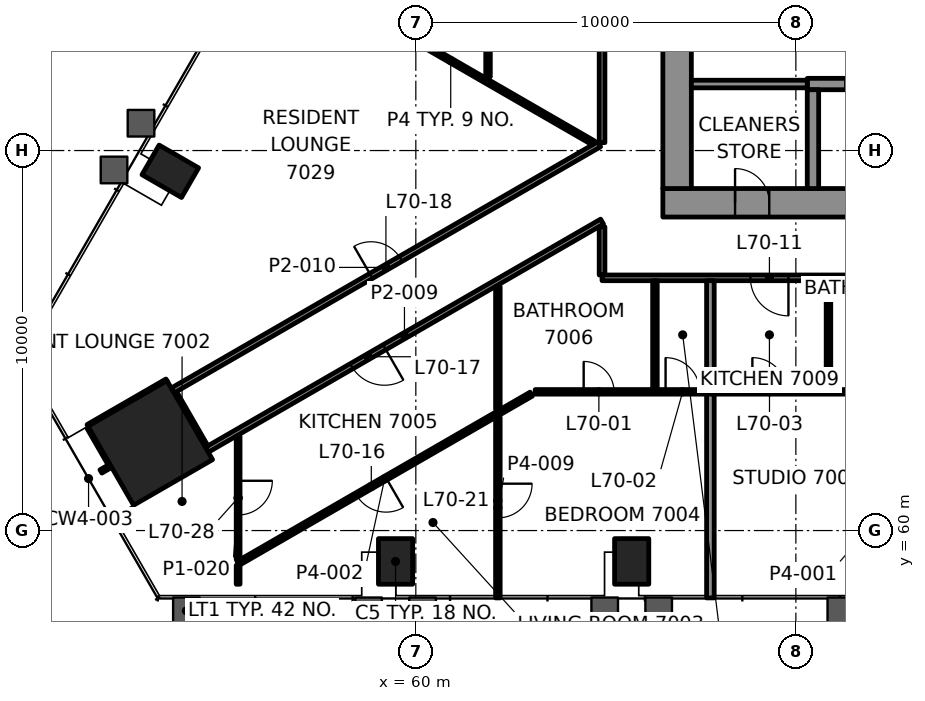
"""IFC4 building model, lengths in metres.
Left out: names, types, materials, properties, quantities, classifications, styles, units other than length and angle.
Written with IfcOpenShell. Run it as: python <this file> out.ifc"""

import sys

from ifc_helpers import new_model, si_unit, direction, frame, frame_2d, origin, origin_2d, place, context, subcontext, project, spatial, rectangle, hollow_rectangle, extrude, element, fill, save


model = new_model("IFC4")
c1 = context("Model", 3, precision=1e-05, world=origin(), true_north=direction((0.0, 1.0)))
c2 = subcontext(c1, "Body", "Model", "MODEL_VIEW")
j1 = project(units=[si_unit("LENGTHUNIT", "METRE"), si_unit("PLANEANGLEUNIT", "RADIAN")], contexts=[c1])
p1 = place(None, origin())
s1 = spatial("IfcSite", under=j1, at=p1, CompositionType="ELEMENT")
p2 = place(p1, origin())
s2 = spatial("IfcBuilding", under=s1, at=p2, CompositionType="ELEMENT")
p3 = place(p2, frame((0.0, 0.0, 291.6)))
s3 = spatial("IfcBuildingStorey", under=s2, at=p3, CompositionType="ELEMENT", Elevation=291.6)
p4 = place(p3, frame((53.012, 62.305, 0.0), z_axis=(0.0, 0.0, 1.0), x_axis=(0.5, -0.866025403784, 0.0)))
e1 = element("IfcColumn", 1, at=p4, inside=s3, PredefinedType="COLUMN", context=c2, shape_type="SweptSolid", body=[
    extrude(rectangle(XDim=2.4, YDim=2.4, at=origin_2d()), origin(), (0.0, 0.0, 1.0), 3.5),
])
for number, where, z_axis, x_axis in (
    (2, (59.467, 59.188, -0.0), (0.0, 0.0, 1.0), (1.0, 0.0, 0.0)),
    (3, (65.68, 59.188, -0.0), (0.0, 0.0, 1.0), (1.0, 0.0, 0.0)),
    (4, (53.539, 69.454, -0.0), (0.0, 0.0, 1.0), (-0.5, -0.866, 0.0)),
):
    element("IfcColumn", number, at=place(p3, frame(where, z_axis=z_axis, x_axis=x_axis)), inside=s3, PredefinedType="COLUMN", context=c2, shape_type="SweptSolid", body=[
        extrude(hollow_rectangle(XDim=0.9, YDim=1.2, WallThickness=0.06, at=origin_2d()), origin(), (0.0, 0.0, 1.0), 3.5),
    ])
p5 = place(p3, frame((66.5, 68.625, 0.0), z_axis=(0.0, 0.0, 1.0), x_axis=(1.0, 0.0, 0.0)))
e5 = element("IfcWall", 5, at=p5, inside=s3, PredefinedType="SHEAR", context=c2, shape_type="SweptSolid", body=[
    extrude(rectangle(XDim=17.0, YDim=0.75, at=frame_2d((8.5, 0.0))), origin(), (0.0, 0.0, 1.0), 3.3),
])
p6 = place(p5, frame((1.9, 0.0, 0.0)))
e6 = element("IfcOpeningElement", 6, at=p6, cuts=e5, PredefinedType="OPENING", context=c2, shape_type="SweptSolid", body=[
    extrude(rectangle(XDim=0.9, YDim=2.1, at=frame_2d((0.45, 1.05))), frame((0.0, 0.385, 0.0), z_axis=(0.0, -1.0, 0.0), x_axis=(1.0, 0.0, 0.0)), (0.0, 0.0, 1.0), 0.77),
])
p7 = place(p3, frame((66.875, 69.0, 0.0), z_axis=(0.0, 0.0, 1.0), x_axis=(0.0, 1.0, 0.0)))
e7 = element("IfcWall", 7, at=p7, inside=s3, PredefinedType="SHEAR", context=c2, shape_type="SweptSolid", body=[
    extrude(rectangle(XDim=12.0, YDim=0.75, at=frame_2d((6.0, 0.0))), origin(), (0.0, 0.0, 1.0), 3.3),
])
p8 = place(p7, frame((3.7, 0.0, 0.0)))
e8 = element("IfcOpeningElement", 8, at=p8, cuts=e7, PredefinedType="OPENING", context=c2, shape_type="SweptSolid", body=[
    extrude(rectangle(XDim=1.2, YDim=2.1, at=frame_2d((0.6, 1.05))), frame((0.0, 0.385, 0.0), z_axis=(0.0, -1.0, 0.0), x_axis=(1.0, 0.0, 0.0)), (0.0, 0.0, 1.0), 0.77),
])
p9 = place(p3, frame((70.3, 71.75, 0.0), z_axis=(0.0, 0.0, 1.0), x_axis=(1.0, 0.0, 0.0)))
e9 = element("IfcWall", 9, at=p9, inside=s3, PredefinedType="SHEAR", context=c2, shape_type="SweptSolid", body=[
    extrude(rectangle(XDim=11.5, YDim=0.3, at=frame_2d((5.75, 0.0))), origin(), (0.0, 0.0, 1.0), 3.3),
])
p10 = place(p9, frame((1.0, 0.0, 0.0)))
e10 = element("IfcOpeningElement", 10, at=p10, cuts=e9, PredefinedType="OPENING", context=c2, shape_type="SweptSolid", body=[
    extrude(rectangle(XDim=1.1, YDim=2.1, at=frame_2d((0.55, 1.05))), frame((0.0, 0.16, 0.0), z_axis=(0.0, -1.0, 0.0), x_axis=(1.0, 0.0, 0.0)), (0.0, 0.0, 1.0), 0.32),
])
p11 = place(p9, frame((3.8, 0.0, 0.0)))
e11 = element("IfcOpeningElement", 11, at=p11, cuts=e9, PredefinedType="OPENING", context=c2, shape_type="SweptSolid", body=[
    extrude(rectangle(XDim=1.1, YDim=2.1, at=frame_2d((0.55, 1.05))), frame((0.0, 0.16, 0.0), z_axis=(0.0, -1.0, 0.0), x_axis=(1.0, 0.0, 0.0)), (0.0, 0.0, 1.0), 0.32),
])
p12 = place(p9, frame((6.6, 0.0, 0.0)))
e12 = element("IfcOpeningElement", 12, at=p12, cuts=e9, PredefinedType="OPENING", context=c2, shape_type="SweptSolid", body=[
    extrude(rectangle(XDim=1.1, YDim=2.1, at=frame_2d((0.55, 1.05))), frame((0.0, 0.16, 0.0), z_axis=(0.0, -1.0, 0.0), x_axis=(1.0, 0.0, 0.0)), (0.0, 0.0, 1.0), 0.32),
])
p13 = place(p9, frame((9.4, 0.0, 0.0)))
e13 = element("IfcOpeningElement", 13, at=p13, cuts=e9, PredefinedType="OPENING", context=c2, shape_type="SweptSolid", body=[
    extrude(rectangle(XDim=1.1, YDim=2.1, at=frame_2d((0.55, 1.05))), frame((0.0, 0.16, 0.0), z_axis=(0.0, -1.0, 0.0), x_axis=(1.0, 0.0, 0.0)), (0.0, 0.0, 1.0), 0.32),
])
p14 = place(p3, frame((70.45, 69.0, 0.0), z_axis=(0.0, 0.0, 1.0), x_axis=(0.0, 1.0, 0.0)))
e14 = element("IfcWall", 14, at=p14, inside=s3, PredefinedType="SHEAR", context=c2, shape_type="SweptSolid", body=[
    extrude(rectangle(XDim=2.6, YDim=0.3, at=frame_2d((1.3, 0.0))), origin(), (0.0, 0.0, 1.0), 3.3),
])
p15 = place(p3, frame((63.141, 63.65, 0.0), z_axis=(0.0, 0.0, 1.0), x_axis=(1.0, 0.0, 0.0)))
e15 = element("IfcWall", 15, at=p15, inside=s3, PredefinedType="PARTITIONING", context=c2, shape_type="SweptSolid", body=[
    extrude(rectangle(XDim=23.718, YDim=0.12, at=frame_2d((11.859, 0.0))), origin(), (0.0, 0.0, 1.0), 2.7),
])
p16 = place(p15, frame((1.276, 0.0, 0.0)))
e16 = element("IfcOpeningElement", 16, at=p16, cuts=e15, PredefinedType="OPENING", context=c2, shape_type="SweptSolid", body=[
    extrude(rectangle(XDim=0.8, YDim=2.1, at=frame_2d((0.4, 1.05))), frame((0.0, 0.07, 0.0), z_axis=(0.0, -1.0, 0.0), x_axis=(1.0, 0.0, 0.0)), (0.0, 0.0, 1.0), 0.14),
])
p17 = place(p15, frame((3.43, 0.0, 0.0)))
e17 = element("IfcOpeningElement", 17, at=p17, cuts=e15, PredefinedType="OPENING", context=c2, shape_type="SweptSolid", body=[
    extrude(rectangle(XDim=0.9, YDim=2.1, at=frame_2d((0.45, 1.05))), frame((0.0, 0.07, 0.0), z_axis=(0.0, -1.0, 0.0), x_axis=(1.0, 0.0, 0.0)), (0.0, 0.0, 1.0), 0.14),
])
p18 = place(p15, frame((5.715, 0.0, 0.0)))
e18 = element("IfcOpeningElement", 18, at=p18, cuts=e15, PredefinedType="OPENING", context=c2, shape_type="SweptSolid", body=[
    extrude(rectangle(XDim=0.9, YDim=2.1, at=frame_2d((0.45, 1.05))), frame((0.0, 0.07, 0.0), z_axis=(0.0, -1.0, 0.0), x_axis=(1.0, 0.0, 0.0)), (0.0, 0.0, 1.0), 0.14),
])
p19 = place(p15, frame((8.87, 0.0, 0.0)))
e19 = element("IfcOpeningElement", 19, at=p19, cuts=e15, PredefinedType="OPENING", context=c2, shape_type="SweptSolid", body=[
    extrude(rectangle(XDim=0.8, YDim=2.1, at=frame_2d((0.4, 1.05))), frame((0.0, 0.07, 0.0), z_axis=(0.0, -1.0, 0.0), x_axis=(1.0, 0.0, 0.0)), (0.0, 0.0, 1.0), 0.14),
])
p20 = place(p15, frame((11.928, 0.0, 0.0)))
e20 = element("IfcOpeningElement", 20, at=p20, cuts=e15, PredefinedType="OPENING", context=c2, shape_type="SweptSolid", body=[
    extrude(rectangle(XDim=0.9, YDim=2.1, at=frame_2d((0.45, 1.05))), frame((0.0, 0.07, 0.0), z_axis=(0.0, -1.0, 0.0), x_axis=(1.0, 0.0, 0.0)), (0.0, 0.0, 1.0), 0.14),
])
p21 = place(p15, frame((15.083, 0.0, 0.0)))
e21 = element("IfcOpeningElement", 21, at=p21, cuts=e15, PredefinedType="OPENING", context=c2, shape_type="SweptSolid", body=[
    extrude(rectangle(XDim=0.8, YDim=2.1, at=frame_2d((0.4, 1.05))), frame((0.0, 0.07, 0.0), z_axis=(0.0, -1.0, 0.0), x_axis=(1.0, 0.0, 0.0)), (0.0, 0.0, 1.0), 0.14),
])
p22 = place(p15, frame((18.141, 0.0, 0.0)))
e22 = element("IfcOpeningElement", 22, at=p22, cuts=e15, PredefinedType="OPENING", context=c2, shape_type="SweptSolid", body=[
    extrude(rectangle(XDim=0.9, YDim=2.1, at=frame_2d((0.45, 1.05))), frame((0.0, 0.07, 0.0), z_axis=(0.0, -1.0, 0.0), x_axis=(1.0, 0.0, 0.0)), (0.0, 0.0, 1.0), 0.14),
])
p23 = place(p15, frame((21.297, 0.0, 0.0)))
e23 = element("IfcOpeningElement", 23, at=p23, cuts=e15, PredefinedType="OPENING", context=c2, shape_type="SweptSolid", body=[
    extrude(rectangle(XDim=0.8, YDim=2.1, at=frame_2d((0.4, 1.05))), frame((0.0, 0.07, 0.0), z_axis=(0.0, -1.0, 0.0), x_axis=(1.0, 0.0, 0.0)), (0.0, 0.0, 1.0), 0.14),
])
p24 = place(p3, frame((85.1, 66.65, 0.0), z_axis=(0.0, 0.0, 1.0), x_axis=(-1.0, 0.0, 0.0)))
e24 = element("IfcWall", 24, at=p24, inside=s3, PredefinedType="PARTITIONING", context=c2, shape_type="SweptSolid", body=[
    extrude(rectangle(XDim=20.2, YDim=0.15, at=frame_2d((10.1, 0.0))), origin(), (0.0, 0.0, 1.0), 2.7),
])
p25 = place(p24, frame((2.869, 0.0, 0.0)))
e25 = element("IfcOpeningElement", 25, at=p25, cuts=e24, PredefinedType="OPENING", context=c2, shape_type="SweptSolid", body=[
    extrude(rectangle(XDim=1.0, YDim=2.1, at=frame_2d((0.5, 1.05))), frame((0.0, 0.085, 0.0), z_axis=(0.0, -1.0, 0.0), x_axis=(1.0, 0.0, 0.0)), (0.0, 0.0, 1.0), 0.17),
])
p26 = place(p24, frame((9.082, 0.0, 0.0)))
e26 = element("IfcOpeningElement", 26, at=p26, cuts=e24, PredefinedType="OPENING", context=c2, shape_type="SweptSolid", body=[
    extrude(rectangle(XDim=1.0, YDim=2.1, at=frame_2d((0.5, 1.05))), frame((0.0, 0.085, 0.0), z_axis=(0.0, -1.0, 0.0), x_axis=(1.0, 0.0, 0.0)), (0.0, 0.0, 1.0), 0.17),
])
p27 = place(p24, frame((15.296, 0.0, 0.0)))
e27 = element("IfcOpeningElement", 27, at=p27, cuts=e24, PredefinedType="OPENING", context=c2, shape_type="SweptSolid", body=[
    extrude(rectangle(XDim=1.0, YDim=2.1, at=frame_2d((0.5, 1.05))), frame((0.0, 0.085, 0.0), z_axis=(0.0, -1.0, 0.0), x_axis=(1.0, 0.0, 0.0)), (0.0, 0.0, 1.0), 0.17),
])
p28 = place(p3, frame((63.037, 63.59, 0.0), z_axis=(0.0, 0.0, 1.0), x_axis=(-0.866021245731, -0.500007201891, 0.0)))
e28 = element("IfcWall", 28, at=p28, inside=s3, PredefinedType="PARTITIONING", context=c2, shape_type="SweptSolid", body=[
    extrude(rectangle(XDim=8.906, YDim=0.12, at=frame_2d((4.453, 0.0))), origin(), (0.0, 0.0, 1.0), 2.7),
])
p29 = place(p28, frame((4.41, 0.0, 0.0)))
e29 = element("IfcOpeningElement", 29, at=p29, cuts=e28, PredefinedType="OPENING", context=c2, shape_type="SweptSolid", body=[
    extrude(rectangle(XDim=0.9, YDim=2.1, at=frame_2d((0.45, 1.05))), frame((0.0, 0.07, 0.0), z_axis=(0.0, -1.0, 0.0), x_axis=(1.0, 0.0, 0.0)), (0.0, 0.0, 1.0), 0.14),
])
p30 = place(p3, frame((64.9, 68.13, 0.0), z_axis=(0.0, 0.0, 1.0), x_axis=(-0.866024746207, -0.500001138955, 0.0)))
e30 = element("IfcWall", 30, at=p30, inside=s3, PredefinedType="PARTITIONING", context=c2, shape_type="SweptSolid", body=[
    extrude(rectangle(XDim=12.007, YDim=0.15, at=frame_2d((6.003, 0.0))), origin(), (0.0, 0.0, 1.0), 2.547),
])
p31 = place(p30, frame((6.611, 0.0, 0.0)))
e31 = element("IfcOpeningElement", 31, at=p31, cuts=e30, PredefinedType="OPENING", context=c2, shape_type="SweptSolid", body=[
    extrude(rectangle(XDim=1.0, YDim=2.1, at=frame_2d((0.5, 1.05))), frame((0.0, 0.085, 0.0), z_axis=(0.0, -1.0, 0.0), x_axis=(1.0, 0.0, 0.0)), (0.0, 0.0, 1.0), 0.17),
])
p32 = place(p3, frame((51.713, 61.555, 0.0), z_axis=(0.0, 0.0, 1.0), x_axis=(0.866071776036, 0.499919672301, 0.0)))
e32 = element("IfcWall", 32, at=p32, inside=s3, PredefinedType="PARTITIONING", context=c2, shape_type="SweptSolid", body=[
    extrude(rectangle(XDim=0.25, YDim=0.1, at=frame_2d((0.125, 0.0))), origin(), (0.0, 0.0, 1.0), 2.7),
])
p33 = place(p3, frame((53.601, 63.685, 0.0), z_axis=(0.0, 0.0, 1.0), x_axis=(0.866024967991, 0.500000754816, 0.0)))
e33 = element("IfcWall", 33, at=p33, inside=s3, PredefinedType="PARTITIONING", context=c2, shape_type="SweptSolid", body=[
    extrude(rectangle(XDim=12.96, YDim=0.15, at=frame_2d((6.48, 0.0))), origin(), (0.0, 0.0, 1.0), 2.7),
])
p34 = place(p33, frame((6.03, 0.0, 0.0)))
e34 = element("IfcOpeningElement", 34, at=p34, cuts=e33, PredefinedType="OPENING", context=c2, shape_type="SweptSolid", body=[
    extrude(rectangle(XDim=0.9, YDim=2.1, at=frame_2d((0.45, 1.05))), frame((0.0, 0.085, 0.0), z_axis=(0.0, -1.0, 0.0), x_axis=(1.0, 0.0, 0.0)), (0.0, 0.0, 1.0), 0.17),
])
p35 = place(p3, frame((51.373, 62.745, 0.0), z_axis=(0.0, 0.0, 1.0), x_axis=(0.866036455013, 0.499980858223, 0.0)))
e35 = element("IfcWall", 35, at=p35, inside=s3, PredefinedType="PARTITIONING", context=c2, shape_type="SweptSolid", body=[
    extrude(rectangle(XDim=2.399, YDim=0.1, at=frame_2d((1.199, 0.0))), origin(), (0.0, 0.0, 1.0), 2.7),
])
p36 = place(p3, frame((70.858, 63.71, 0.0), z_axis=(0.0, 0.0, 1.0), x_axis=(0.0, 1.0, 0.0)))
e36 = element("IfcWall", 36, at=p36, inside=s3, PredefinedType="PARTITIONING", context=c2, shape_type="SweptSolid", body=[
    extrude(rectangle(XDim=2.865, YDim=0.12, at=frame_2d((1.433, 0.0))), origin(), (0.0, 0.0, 1.0), 2.7),
])
p37 = place(p3, frame((67.751, 58.228, 0.0), z_axis=(0.0, 0.0, 1.0), x_axis=(0.0, 1.0, 0.0)))
e37 = element("IfcWall", 37, at=p37, inside=s3, PredefinedType="PARTITIONING", context=c2, shape_type="SweptSolid", body=[
    extrude(rectangle(XDim=5.363, YDim=0.2, at=frame_2d((2.681, 0.0))), origin(), (0.0, 0.0, 1.0), 2.688),
])
p38 = place(p3, frame((66.292, 63.71, 0.0), z_axis=(0.0, 0.0, 1.0), x_axis=(0.0, 1.0, 0.0)))
e38 = element("IfcWall", 38, at=p38, inside=s3, PredefinedType="PARTITIONING", context=c2, shape_type="SweptSolid", body=[
    extrude(rectangle(XDim=2.865, YDim=0.12, at=frame_2d((1.433, 0.0))), origin(), (0.0, 0.0, 1.0), 2.7),
])
p39 = place(p3, frame((64.9, 66.725, 0.0), z_axis=(0.0, 0.0, 1.0), x_axis=(0.0, 1.0, 0.0)))
e39 = element("IfcWall", 39, at=p39, inside=s3, PredefinedType="PARTITIONING", context=c2, shape_type="SweptSolid", body=[
    extrude(rectangle(XDim=1.268, YDim=0.15, at=frame_2d((0.634, 0.0))), origin(), (0.0, 0.0, 1.0), 2.547),
])
p40 = place(p3, frame((64.9, 70.208, 0.0), z_axis=(0.0, 0.0, 1.0), x_axis=(0.0, 1.0, 0.0)))
e40 = element("IfcWall", 40, at=p40, inside=s3, PredefinedType="PARTITIONING", context=c2, shape_type="SweptSolid", body=[
    extrude(rectangle(XDim=13.14, YDim=0.15, at=frame_2d((6.57, 0.0))), origin(), (0.0, 0.0, 1.0), 2.7),
])
p41 = place(p40, frame((4.743, 0.0, 0.0)))
e41 = element("IfcOpeningElement", 41, at=p41, cuts=e40, PredefinedType="OPENING", context=c2, shape_type="SweptSolid", body=[
    extrude(rectangle(XDim=1.0, YDim=2.1, at=frame_2d((0.5, 1.05))), frame((0.0, 0.085, 0.0), z_axis=(0.0, -1.0, 0.0), x_axis=(1.0, 0.0, 0.0)), (0.0, 0.0, 1.0), 0.17),
])
p42 = place(p3, frame((62.159, 62.979, 0.0), z_axis=(0.0, 0.0, 1.0), x_axis=(0.0, -1.0, 0.0)))
e42 = element("IfcWall", 42, at=p42, inside=s3, PredefinedType="PARTITIONING", context=c2, shape_type="SweptSolid", body=[
    extrude(rectangle(XDim=4.751, YDim=0.12, at=frame_2d((2.376, 0.0))), origin(), (0.0, 0.0, 1.0), 2.688),
])
p43 = place(p42, frame((1.746, 0.0, 0.0)))
e43 = element("IfcOpeningElement", 43, at=p43, cuts=e42, PredefinedType="OPENING", context=c2, shape_type="SweptSolid", body=[
    extrude(rectangle(XDim=0.9, YDim=2.1, at=frame_2d((0.45, 1.05))), frame((0.0, 0.07, 0.0), z_axis=(0.0, -1.0, 0.0), x_axis=(1.0, 0.0, 0.0)), (0.0, 0.0, 1.0), 0.14),
])
p44 = place(p3, frame((61.9, 85.855, 0.0), z_axis=(0.0, 0.0, 1.0), x_axis=(0.0, -1.0, 0.0)))
e44 = element("IfcWall", 44, at=p44, inside=s3, PredefinedType="PARTITIONING", context=c2, shape_type="SweptSolid", body=[
    extrude(rectangle(XDim=13.915, YDim=0.12, at=frame_2d((6.958, 0.0))), origin(), (0.0, 0.0, 1.0), 2.688),
])
p45 = place(p44, frame((8.224, 0.0, 0.0)))
e45 = element("IfcOpeningElement", 45, at=p45, cuts=e44, PredefinedType="OPENING", context=c2, shape_type="SweptSolid", body=[
    extrude(rectangle(XDim=0.9, YDim=2.1, at=frame_2d((0.45, 1.05))), frame((0.0, 0.07, 0.0), z_axis=(0.0, -1.0, 0.0), x_axis=(1.0, 0.0, 0.0)), (0.0, 0.0, 1.0), 0.14),
])
p46 = place(p44, frame((11.69, 0.0, 0.0)))
e46 = element("IfcOpeningElement", 46, at=p46, cuts=e44, PredefinedType="OPENING", context=c2, shape_type="SweptSolid", body=[
    extrude(rectangle(XDim=0.8, YDim=2.1, at=frame_2d((0.4, 1.05))), frame((0.0, 0.07, 0.0), z_axis=(0.0, -1.0, 0.0), x_axis=(1.0, 0.0, 0.0)), (0.0, 0.0, 1.0), 0.14),
])
p47 = place(p3, frame((55.324, 58.588, 0.0), z_axis=(0.0, 0.0, 1.0), x_axis=(0.0, 1.0, 0.0)))
e47 = element("IfcWall", 47, at=p47, inside=s3, PredefinedType="PARTITIONING", context=c2, shape_type="SweptSolid", body=[
    extrude(rectangle(XDim=0.498, YDim=0.1, at=frame_2d((0.249, 0.0))), origin(), (0.0, 0.0, 1.0), 2.7),
])
p48 = place(p3, frame((54.464, 62.191, 0.0), z_axis=(0.0, 0.0, 1.0), x_axis=(-0.499988108725, 0.866032269107, 0.0)))
e48 = element("IfcWall", 48, at=p48, inside=s3, PredefinedType="PARTITIONING", context=c2, shape_type="SweptSolid", body=[
    extrude(rectangle(XDim=1.644, YDim=0.15, at=frame_2d((0.822, 0.0))), origin(), (0.0, 0.0, 1.0), 2.547),
])
p49 = place(p3, frame((51.973, 61.706, 0.0), z_axis=(0.0, 0.0, 1.0), x_axis=(-0.500022773673, 0.866012254999, 0.0)))
e49 = element("IfcWall", 49, at=p49, inside=s3, PredefinedType="PARTITIONING", context=c2, shape_type="SweptSolid", body=[
    extrude(rectangle(XDim=1.149, YDim=0.1, at=frame_2d((0.575, 0.0))), origin(), (0.0, 0.0, 1.0), 2.7),
])
p50 = place(p3, frame((64.67, 70.202, 0.0), z_axis=(0.0, 0.0, 1.0), x_axis=(-0.866027476775, 0.499996409458, 0.0)))
e50 = element("IfcWall", 50, at=p50, inside=s3, PredefinedType="PARTITIONING", context=c2, shape_type="SweptSolid", body=[
    extrude(rectangle(XDim=8.666, YDim=0.12, at=frame_2d((4.333, 0.0))), origin(), (0.0, 0.0, 1.0), 2.7),
])
p51 = place(p3, frame((62.159, 63.187, 0.0), z_axis=(0.0, 0.0, 1.0), x_axis=(0.0, 1.0, 0.0)))
e51 = element("IfcWall", 51, at=p51, inside=s3, PredefinedType="PARTITIONING", context=c2, shape_type="SweptSolid", body=[
    extrude(rectangle(XDim=3.233, YDim=0.12, at=frame_2d((1.617, 0.0))), origin(), (0.0, 0.0, 1.0), 2.547),
])
p52 = place(p3, frame((55.324, 62.484, 0.0), z_axis=(0.0, 0.0, 1.0), x_axis=(0.0, -1.0, 0.0)))
e52 = element("IfcWall", 52, at=p52, inside=s3, PredefinedType="PARTITIONING", context=c2, shape_type="SweptSolid", body=[
    extrude(rectangle(XDim=3.25, YDim=0.1, at=frame_2d((1.625, 0.0))), origin(), (0.0, 0.0, 1.0), 2.7),
])
p53 = place(p52, frame((1.175, 0.0, 0.0)))
e53 = element("IfcOpeningElement", 53, at=p53, cuts=e52, PredefinedType="OPENING", context=c2, shape_type="SweptSolid", body=[
    extrude(rectangle(XDim=0.9, YDim=2.1, at=frame_2d((0.45, 1.05))), frame((0.0, 0.06, 0.0), z_axis=(0.0, -1.0, 0.0), x_axis=(1.0, 0.0, 0.0)), (0.0, 0.0, 1.0), 0.12),
])
p54 = place(p3, frame((67.751, 63.71, 0.0), z_axis=(0.0, 0.0, 1.0), x_axis=(0.0, 1.0, 0.0)))
e54 = element("IfcWall", 54, at=p54, inside=s3, PredefinedType="PARTITIONING", context=c2, shape_type="SweptSolid", body=[
    extrude(rectangle(XDim=2.865, YDim=0.2, at=frame_2d((1.433, 0.0))), origin(), (0.0, 0.0, 1.0), 2.7),
])
p55 = place(p3, frame((67.25, 71.75, 0.0), z_axis=(0.0, 0.0, 1.0), x_axis=(1.0, 0.0, 0.0)))
e55 = element("IfcWall", 55, at=p55, inside=s3, PredefinedType="PARTITIONING", context=c2, shape_type="SweptSolid", body=[
    extrude(rectangle(XDim=3.05, YDim=0.2, at=frame_2d((1.525, 0.0))), origin(), (0.0, 0.0, 1.0), 3.3),
])
p56 = place(p16, origin())
e56 = element("IfcDoor", 56, at=p56, inside=s3, OperationType="SINGLE_SWING_RIGHT", PredefinedType="DOOR", context=c2, shape_type="SweptSolid", body=[
    extrude(rectangle(XDim=0.8, YDim=2.1, at=frame_2d((0.4, 1.05))), frame((0.0, 0.025, 0.0), z_axis=(0.0, -1.0, 0.0), x_axis=(1.0, 0.0, 0.0)), (0.0, 0.0, 1.0), 0.05),
])
fill(e16, e56)
p57 = place(p17, origin())
e57 = element("IfcDoor", 57, at=p57, inside=s3, OperationType="SINGLE_SWING_LEFT", PredefinedType="DOOR", context=c2, shape_type="SweptSolid", body=[
    extrude(rectangle(XDim=0.9, YDim=2.1, at=frame_2d((0.45, 1.05))), frame((0.0, 0.025, 0.0), z_axis=(0.0, -1.0, 0.0), x_axis=(1.0, 0.0, 0.0)), (0.0, 0.0, 1.0), 0.05),
])
fill(e17, e57)
p58 = place(p18, origin())
e58 = element("IfcDoor", 58, at=p58, inside=s3, OperationType="SINGLE_SWING_LEFT", PredefinedType="DOOR", context=c2, shape_type="SweptSolid", body=[
    extrude(rectangle(XDim=0.9, YDim=2.1, at=frame_2d((0.45, 1.05))), frame((0.0, 0.025, 0.0), z_axis=(0.0, -1.0, 0.0), x_axis=(1.0, 0.0, 0.0)), (0.0, 0.0, 1.0), 0.05),
])
fill(e18, e58)
p59 = place(p27, origin())
e59 = element("IfcDoor", 59, at=p59, inside=s3, OperationType="SINGLE_SWING_LEFT", PredefinedType="DOOR", context=c2, shape_type="SweptSolid", body=[
    extrude(rectangle(XDim=1.0, YDim=2.1, at=frame_2d((0.5, 1.05))), frame((0.0, 0.025, 0.0), z_axis=(0.0, -1.0, 0.0), x_axis=(1.0, 0.0, 0.0)), (0.0, 0.0, 1.0), 0.05),
])
fill(e27, e59)
p60 = place(p29, origin())
e60 = element("IfcDoor", 60, at=p60, inside=s3, OperationType="SINGLE_SWING_LEFT", PredefinedType="DOOR", context=c2, shape_type="SweptSolid", body=[
    extrude(rectangle(XDim=0.9, YDim=2.1, at=frame_2d((0.45, 1.05))), frame((0.0, 0.025, 0.0), z_axis=(0.0, -1.0, 0.0), x_axis=(1.0, 0.0, 0.0)), (0.0, 0.0, 1.0), 0.05),
])
fill(e29, e60)
p61 = place(p31, origin())
e61 = element("IfcDoor", 61, at=p61, inside=s3, OperationType="SINGLE_SWING_RIGHT", PredefinedType="DOOR", context=c2, shape_type="SweptSolid", body=[
    extrude(rectangle(XDim=1.0, YDim=2.1, at=frame_2d((0.5, 1.05))), frame((0.0, 0.025, 0.0), z_axis=(0.0, -1.0, 0.0), x_axis=(1.0, 0.0, 0.0)), (0.0, 0.0, 1.0), 0.05),
])
fill(e31, e61)
p62 = place(p34, origin())
e62 = element("IfcDoor", 62, at=p62, inside=s3, OperationType="SINGLE_SWING_RIGHT", PredefinedType="DOOR", context=c2, shape_type="SweptSolid", body=[
    extrude(rectangle(XDim=0.9, YDim=2.1, at=frame_2d((0.45, 1.05))), frame((0.0, 0.025, 0.0), z_axis=(0.0, -1.0, 0.0), x_axis=(1.0, 0.0, 0.0)), (0.0, 0.0, 1.0), 0.05),
])
fill(e34, e62)
p63 = place(p43, origin())
e63 = element("IfcDoor", 63, at=p63, inside=s3, OperationType="SINGLE_SWING_LEFT", PredefinedType="DOOR", context=c2, shape_type="SweptSolid", body=[
    extrude(rectangle(XDim=0.9, YDim=2.1, at=frame_2d((0.45, 1.05))), frame((0.0, 0.025, 0.0), z_axis=(0.0, -1.0, 0.0), x_axis=(1.0, 0.0, 0.0)), (0.0, 0.0, 1.0), 0.05),
])
fill(e43, e63)
p64 = place(p53, origin())
e64 = element("IfcDoor", 64, at=p64, inside=s3, OperationType="SINGLE_SWING_RIGHT", PredefinedType="DOOR", context=c2, shape_type="SweptSolid", body=[
    extrude(rectangle(XDim=0.9, YDim=2.1, at=frame_2d((0.45, 1.05))), frame((0.0, 0.025, 0.0), z_axis=(0.0, -1.0, 0.0), x_axis=(1.0, 0.0, 0.0)), (0.0, 0.0, 1.0), 0.05),
])
fill(e53, e64)
p65 = place(p6, origin())
e65 = element("IfcDoor", 65, at=p65, inside=s3, OperationType="SINGLE_SWING_RIGHT", PredefinedType="DOOR", context=c2, shape_type="SweptSolid", body=[
    extrude(rectangle(XDim=0.9, YDim=2.1, at=frame_2d((0.45, 1.05))), frame((0.0, 0.095, 0.0), z_axis=(0.0, -1.0, 0.0), x_axis=(1.0, 0.0, 0.0)), (0.0, 0.0, 1.0), 0.19),
])
fill(e6, e65)
save(model, sys.argv[1])
